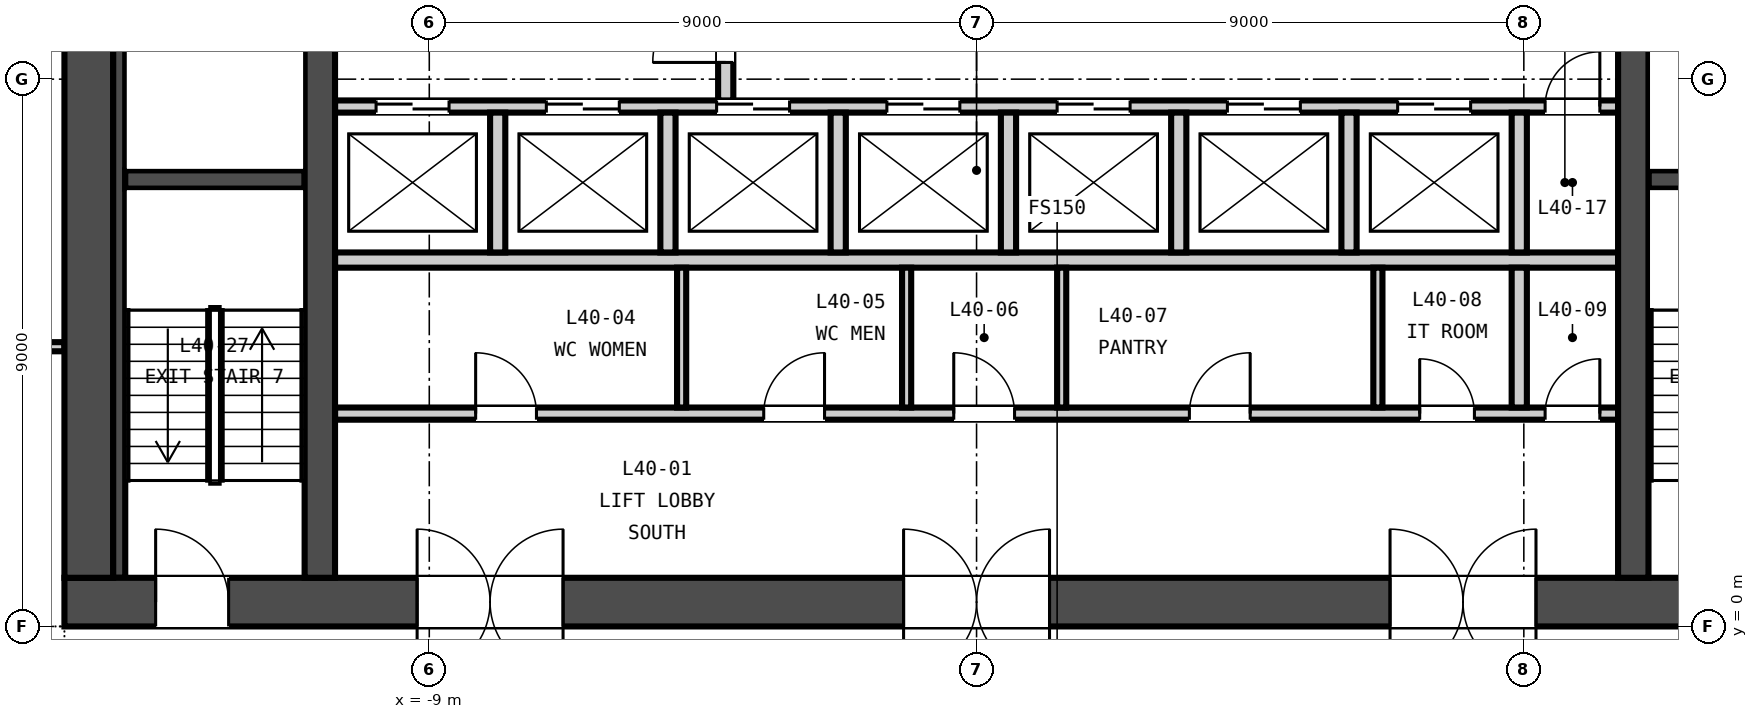
"""IFC4 building model, lengths in metres.
Left out: names, types, materials, properties, quantities, classifications, styles, units other than length and angle.
Written with IfcOpenShell. Run it as: python <this file> out.ifc"""

import sys

from ifc_helpers import new_model, si_unit, direction, frame, frame_2d, origin, place, context, subcontext, project, spatial, rectangle, extrude, element, fill, save


model = new_model("IFC4")
c1 = context("Model", 3, precision=1e-05, world=origin(), true_north=direction((0.0, 1.0)))
c2 = subcontext(c1, "Body", "Model", "MODEL_VIEW")
j1 = project(units=[si_unit("LENGTHUNIT", "METRE"), si_unit("PLANEANGLEUNIT", "RADIAN")], contexts=[c1])
p1 = place(None, origin())
s1 = spatial("IfcSite", under=j1, at=p1, CompositionType="ELEMENT")
p2 = place(p1, origin())
s2 = spatial("IfcBuilding", under=s1, at=p2, CompositionType="ELEMENT")
p3 = place(p2, frame((0.0, 0.0, 162.65)))
s3 = spatial("IfcBuildingStorey", under=s2, at=p3, CompositionType="ELEMENT", Elevation=162.65)
p4 = place(p3, frame((-15.0, 0.4, -0.15), z_axis=(0.0, 0.0, 1.0), x_axis=(1.0, 0.0, 0.0)))
e1 = element("IfcWall", 1, at=p4, inside=s3, PredefinedType="SOLIDWALL", context=c2, shape_type="SweptSolid", body=[
    extrude(rectangle(XDim=30.0, YDim=0.8, at=frame_2d((15.0, 0.0))), origin(), (0.0, 0.0, 1.0), 3.5),
])
p5 = place(p4, frame((5.8, 0.0, 0.15)))
e2 = element("IfcOpeningElement", 2, at=p5, cuts=e1, PredefinedType="OPENING", context=c2, shape_type="SweptSolid", body=[
    extrude(rectangle(XDim=2.4, YDim=2.4, at=frame_2d((1.2, 1.2))), frame((0.0, 0.41, 0.0), z_axis=(0.0, -1.0, 0.0), x_axis=(1.0, 0.0, 0.0)), (0.0, 0.0, 1.0), 0.82),
])
p6 = place(p4, frame((13.8, 0.0, 0.15)))
e3 = element("IfcOpeningElement", 3, at=p6, cuts=e1, PredefinedType="OPENING", context=c2, shape_type="SweptSolid", body=[
    extrude(rectangle(XDim=2.4, YDim=2.4, at=frame_2d((1.2, 1.2))), frame((0.0, 0.41, 0.0), z_axis=(0.0, -1.0, 0.0), x_axis=(1.0, 0.0, 0.0)), (0.0, 0.0, 1.0), 0.82),
])
p7 = place(p4, frame((21.8, 0.0, 0.15)))
e4 = element("IfcOpeningElement", 4, at=p7, cuts=e1, PredefinedType="OPENING", context=c2, shape_type="SweptSolid", body=[
    extrude(rectangle(XDim=2.4, YDim=2.4, at=frame_2d((1.2, 1.2))), frame((0.0, 0.41, 0.0), z_axis=(0.0, -1.0, 0.0), x_axis=(1.0, 0.0, 0.0)), (0.0, 0.0, 1.0), 0.82),
])
p8 = place(p4, frame((1.5, 0.0, 0.15)))
e5 = element("IfcOpeningElement", 5, at=p8, cuts=e1, PredefinedType="OPENING", context=c2, shape_type="SweptSolid", body=[
    extrude(rectangle(XDim=1.2, YDim=2.1, at=frame_2d((0.6, 1.05))), frame((0.0, 0.41, 0.0), z_axis=(0.0, -1.0, 0.0), x_axis=(1.0, 0.0, 0.0)), (0.0, 0.0, 1.0), 0.82),
])
p9 = place(p4, frame((27.3, 0.0, 0.15)))
e6 = element("IfcOpeningElement", 6, at=p9, cuts=e1, PredefinedType="OPENING", context=c2, shape_type="SweptSolid", body=[
    extrude(rectangle(XDim=1.2, YDim=2.1, at=frame_2d((0.6, 1.05))), frame((0.0, 0.41, 0.0), z_axis=(0.0, -1.0, 0.0), x_axis=(1.0, 0.0, 0.0)), (0.0, 0.0, 1.0), 0.82),
])
p10 = place(p3, frame((-14.6, 0.8, -0.15), z_axis=(0.0, 0.0, 1.0), x_axis=(0.0, 1.0, 0.0)))
e7 = element("IfcWall", 7, at=p10, inside=s3, PredefinedType="SOLIDWALL", context=c2, shape_type="SweptSolid", body=[
    extrude(rectangle(XDim=13.4, YDim=0.8, at=frame_2d((6.7, 0.0))), origin(), (0.0, 0.0, 1.0), 3.5),
])
for number, where, z_axis, x_axis in (
    (8, (-10.8, 0.8, -0.15), (0.0, 0.0, 1.0), (0.0, 1.0, 0.0)),
    (9, (10.8, 0.8, -0.15), (0.0, 0.0, 1.0), (0.0, 1.0, 0.0)),
):
    element("IfcWall", number, at=place(p3, frame(where, z_axis=z_axis, x_axis=x_axis)), inside=s3, PredefinedType="SOLIDWALL", context=c2, shape_type="SweptSolid", body=[
        extrude(rectangle(XDim=13.4, YDim=0.5, at=frame_2d((6.7, 0.0))), origin(), (0.0, 0.0, 1.0), 3.5),
    ])
p11 = place(p3, frame((-10.55, 3.5, 0.0), z_axis=(0.0, 0.0, 1.0), x_axis=(1.0, 0.0, 0.0)))
e10 = element("IfcWall", 10, at=p11, inside=s3, PredefinedType="PARTITIONING", context=c2, shape_type="SweptSolid", body=[
    extrude(rectangle(XDim=21.1, YDim=0.2, at=frame_2d((10.55, 0.0))), origin(), (0.0, 0.0, 1.0), 3.35),
])
p12 = place(p11, frame((2.312, 0.0, 0.0)))
e11 = element("IfcOpeningElement", 11, at=p12, cuts=e10, PredefinedType="OPENING", context=c2, shape_type="SweptSolid", body=[
    extrude(rectangle(XDim=1.0, YDim=2.1, at=frame_2d((0.5, 1.05))), frame((0.0, 0.11, 0.0), z_axis=(0.0, -1.0, 0.0), x_axis=(1.0, 0.0, 0.0)), (0.0, 0.0, 1.0), 0.22),
])
p13 = place(p11, frame((7.05, 0.0, 0.0)))
e12 = element("IfcOpeningElement", 12, at=p13, cuts=e10, PredefinedType="OPENING", context=c2, shape_type="SweptSolid", body=[
    extrude(rectangle(XDim=1.0, YDim=2.1, at=frame_2d((0.5, 1.05))), frame((0.0, 0.11, 0.0), z_axis=(0.0, -1.0, 0.0), x_axis=(1.0, 0.0, 0.0)), (0.0, 0.0, 1.0), 0.22),
])
p14 = place(p11, frame((10.175, 0.0, 0.0)))
e13 = element("IfcOpeningElement", 13, at=p14, cuts=e10, PredefinedType="OPENING", context=c2, shape_type="SweptSolid", body=[
    extrude(rectangle(XDim=1.0, YDim=2.1, at=frame_2d((0.5, 1.05))), frame((0.0, 0.11, 0.0), z_axis=(0.0, -1.0, 0.0), x_axis=(1.0, 0.0, 0.0)), (0.0, 0.0, 1.0), 0.22),
])
p15 = place(p11, frame((14.05, 0.0, 0.0)))
e14 = element("IfcOpeningElement", 14, at=p15, cuts=e10, PredefinedType="OPENING", context=c2, shape_type="SweptSolid", body=[
    extrude(rectangle(XDim=1.0, YDim=2.1, at=frame_2d((0.5, 1.05))), frame((0.0, 0.11, 0.0), z_axis=(0.0, -1.0, 0.0), x_axis=(1.0, 0.0, 0.0)), (0.0, 0.0, 1.0), 0.22),
])
p16 = place(p11, frame((17.837, 0.0, 0.0)))
e15 = element("IfcOpeningElement", 15, at=p16, cuts=e10, PredefinedType="OPENING", context=c2, shape_type="SweptSolid", body=[
    extrude(rectangle(XDim=0.9, YDim=2.1, at=frame_2d((0.45, 1.05))), frame((0.0, 0.11, 0.0), z_axis=(0.0, -1.0, 0.0), x_axis=(1.0, 0.0, 0.0)), (0.0, 0.0, 1.0), 0.22),
])
p17 = place(p11, frame((19.9, 0.0, 0.0)))
e16 = element("IfcOpeningElement", 16, at=p17, cuts=e10, PredefinedType="OPENING", context=c2, shape_type="SweptSolid", body=[
    extrude(rectangle(XDim=0.9, YDim=2.1, at=frame_2d((0.45, 1.05))), frame((0.0, 0.11, 0.0), z_axis=(0.0, -1.0, 0.0), x_axis=(1.0, 0.0, 0.0)), (0.0, 0.0, 1.0), 0.22),
])
p18 = place(p3, frame((-10.55, 6.025, 0.0), z_axis=(0.0, 0.0, 1.0), x_axis=(1.0, 0.0, 0.0)))
e17 = element("IfcWall", 17, at=p18, inside=s3, PredefinedType="PARTITIONING", context=c2, shape_type="SweptSolid", body=[
    extrude(rectangle(XDim=21.1, YDim=0.25, at=frame_2d((10.55, 0.0))), origin(), (0.0, 0.0, 1.0), 3.35),
])
p19 = place(p3, frame((-10.55, 8.55, 0.0), z_axis=(0.0, 0.0, 1.0), x_axis=(1.0, 0.0, 0.0)))
e18 = element("IfcWall", 18, at=p19, inside=s3, PredefinedType="PARTITIONING", context=c2, shape_type="SweptSolid", body=[
    extrude(rectangle(XDim=21.1, YDim=0.2, at=frame_2d((10.55, 0.0))), origin(), (0.0, 0.0, 1.0), 3.35),
])
p20 = place(p19, frame((0.675, 0.0, 0.0)))
e19 = element("IfcOpeningElement", 19, at=p20, cuts=e18, PredefinedType="OPENING", context=c2, shape_type="SweptSolid", body=[
    extrude(rectangle(XDim=1.2, YDim=2.1, at=frame_2d((0.6, 1.05))), frame((0.0, 0.11, 0.0), z_axis=(0.0, -1.0, 0.0), x_axis=(1.0, 0.0, 0.0)), (0.0, 0.0, 1.0), 0.22),
])
p21 = place(p19, frame((3.475, 0.0, 0.0)))
e20 = element("IfcOpeningElement", 20, at=p21, cuts=e18, PredefinedType="OPENING", context=c2, shape_type="SweptSolid", body=[
    extrude(rectangle(XDim=1.2, YDim=2.1, at=frame_2d((0.6, 1.05))), frame((0.0, 0.11, 0.0), z_axis=(0.0, -1.0, 0.0), x_axis=(1.0, 0.0, 0.0)), (0.0, 0.0, 1.0), 0.22),
])
p22 = place(p19, frame((6.275, 0.0, 0.0)))
e21 = element("IfcOpeningElement", 21, at=p22, cuts=e18, PredefinedType="OPENING", context=c2, shape_type="SweptSolid", body=[
    extrude(rectangle(XDim=1.2, YDim=2.1, at=frame_2d((0.6, 1.05))), frame((0.0, 0.11, 0.0), z_axis=(0.0, -1.0, 0.0), x_axis=(1.0, 0.0, 0.0)), (0.0, 0.0, 1.0), 0.22),
])
p23 = place(p19, frame((9.075, 0.0, 0.0)))
e22 = element("IfcOpeningElement", 22, at=p23, cuts=e18, PredefinedType="OPENING", context=c2, shape_type="SweptSolid", body=[
    extrude(rectangle(XDim=1.2, YDim=2.1, at=frame_2d((0.6, 1.05))), frame((0.0, 0.11, 0.0), z_axis=(0.0, -1.0, 0.0), x_axis=(1.0, 0.0, 0.0)), (0.0, 0.0, 1.0), 0.22),
])
p24 = place(p19, frame((11.875, 0.0, 0.0)))
e23 = element("IfcOpeningElement", 23, at=p24, cuts=e18, PredefinedType="OPENING", context=c2, shape_type="SweptSolid", body=[
    extrude(rectangle(XDim=1.2, YDim=2.1, at=frame_2d((0.6, 1.05))), frame((0.0, 0.11, 0.0), z_axis=(0.0, -1.0, 0.0), x_axis=(1.0, 0.0, 0.0)), (0.0, 0.0, 1.0), 0.22),
])
p25 = place(p19, frame((14.675, 0.0, 0.0)))
e24 = element("IfcOpeningElement", 24, at=p25, cuts=e18, PredefinedType="OPENING", context=c2, shape_type="SweptSolid", body=[
    extrude(rectangle(XDim=1.2, YDim=2.1, at=frame_2d((0.6, 1.05))), frame((0.0, 0.11, 0.0), z_axis=(0.0, -1.0, 0.0), x_axis=(1.0, 0.0, 0.0)), (0.0, 0.0, 1.0), 0.22),
])
p26 = place(p19, frame((17.475, 0.0, 0.0)))
e25 = element("IfcOpeningElement", 25, at=p26, cuts=e18, PredefinedType="OPENING", context=c2, shape_type="SweptSolid", body=[
    extrude(rectangle(XDim=1.2, YDim=2.1, at=frame_2d((0.6, 1.05))), frame((0.0, 0.11, 0.0), z_axis=(0.0, -1.0, 0.0), x_axis=(1.0, 0.0, 0.0)), (0.0, 0.0, 1.0), 0.22),
])
p27 = place(p19, frame((19.9, 0.0, 0.0)))
e26 = element("IfcOpeningElement", 26, at=p27, cuts=e18, PredefinedType="OPENING", context=c2, shape_type="SweptSolid", body=[
    extrude(rectangle(XDim=0.9, YDim=2.1, at=frame_2d((0.45, 1.05))), frame((0.0, 0.11, 0.0), z_axis=(0.0, -1.0, 0.0), x_axis=(1.0, 0.0, 0.0)), (0.0, 0.0, 1.0), 0.22),
])
p28 = place(p3, frame((-4.125, 8.65, 0.0), z_axis=(0.0, 0.0, 1.0), x_axis=(0.0, 1.0, 0.0)))
e27 = element("IfcWall", 27, at=p28, inside=s3, PredefinedType="PARTITIONING", context=c2, shape_type="SweptSolid", body=[
    extrude(rectangle(XDim=2.45, YDim=0.25, at=frame_2d((1.225, 0.0))), origin(), (0.0, 0.0, 1.0), 3.35),
])
p29 = place(p28, frame((0.625, 0.0, 0.0)))
e28 = element("IfcOpeningElement", 28, at=p29, cuts=e27, PredefinedType="OPENING", context=c2, shape_type="SweptSolid", body=[
    extrude(rectangle(XDim=1.2, YDim=2.1, at=frame_2d((0.6, 1.05))), frame((0.0, 0.135, 0.0), z_axis=(0.0, -1.0, 0.0), x_axis=(1.0, 0.0, 0.0)), (0.0, 0.0, 1.0), 0.27),
])
for number, where, z_axis, x_axis in (
    (29, (-4.85, 3.6, 0.0), (0.0, 0.0, 1.0), (0.0, 1.0, 0.0)),
    (30, (-1.15, 3.6, 0.0), (0.0, 0.0, 1.0), (0.0, 1.0, 0.0)),
    (31, (1.4, 3.6, 0.0), (0.0, 0.0, 1.0), (0.0, 1.0, 0.0)),
    (32, (6.6, 3.6, 0.0), (0.0, 0.0, 1.0), (0.0, 1.0, 0.0)),
):
    element("IfcWall", number, at=place(p3, frame(where, z_axis=z_axis, x_axis=x_axis)), inside=s3, PredefinedType="PARTITIONING", context=c2, shape_type="SweptSolid", body=[
        extrude(rectangle(XDim=2.3, YDim=0.15, at=frame_2d((1.15, 0.0))), origin(), (0.0, 0.0, 1.0), 3.35),
    ])
p30 = place(p3, frame((8.925, 3.6, 0.0), z_axis=(0.0, 0.0, 1.0), x_axis=(0.0, 1.0, 0.0)))
e33 = element("IfcWall", 33, at=p30, inside=s3, PredefinedType="PARTITIONING", context=c2, shape_type="SweptSolid", body=[
    extrude(rectangle(XDim=2.3, YDim=0.25, at=frame_2d((1.15, 0.0))), origin(), (0.0, 0.0, 1.0), 3.35),
])
for number, where, z_axis, x_axis in (
    (34, (-7.875, 6.15, 0.0), (0.0, 0.0, 1.0), (0.0, 1.0, 0.0)),
    (35, (-5.075, 6.15, 0.0), (0.0, 0.0, 1.0), (0.0, 1.0, 0.0)),
    (36, (-2.275, 6.15, 0.0), (0.0, 0.0, 1.0), (0.0, 1.0, 0.0)),
    (37, (0.525, 6.15, 0.0), (0.0, 0.0, 1.0), (0.0, 1.0, 0.0)),
    (38, (3.325, 6.15, 0.0), (0.0, 0.0, 1.0), (0.0, 1.0, 0.0)),
    (39, (6.125, 6.15, 0.0), (0.0, 0.0, 1.0), (0.0, 1.0, 0.0)),
    (40, (8.925, 6.15, 0.0), (0.0, 0.0, 1.0), (0.0, 1.0, 0.0)),
):
    element("IfcWall", number, at=place(p3, frame(where, z_axis=z_axis, x_axis=x_axis)), inside=s3, PredefinedType="PARTITIONING", context=c2, shape_type="SweptSolid", body=[
        extrude(rectangle(XDim=2.3, YDim=0.25, at=frame_2d((1.15, 0.0))), origin(), (0.0, 0.0, 1.0), 3.35),
    ])
p31 = place(p3, frame((-14.0, 7.35, 0.0), z_axis=(0.0, 0.0, 1.0), x_axis=(1.0, 0.0, 0.0)))
e41 = element("IfcWall", 41, at=p31, inside=s3, PredefinedType="SOLIDWALL", context=c2, shape_type="SweptSolid", body=[
    extrude(rectangle(XDim=2.95, YDim=0.3, at=frame_2d((1.475, 0.0))), origin(), (0.0, 0.0, 1.0), 3.35),
])
p32 = place(p3, frame((-14.1, 0.8, 0.0), z_axis=(0.0, 0.0, 1.0), x_axis=(0.0, 1.0, 0.0)))
e42 = element("IfcWall", 42, at=p32, inside=s3, PredefinedType="SOLIDWALL", context=c2, shape_type="SweptSolid", body=[
    extrude(rectangle(XDim=13.4, YDim=0.2, at=frame_2d((6.7, 0.0))), origin(), (0.0, 0.0, 1.0), 3.35),
])
p33 = place(p3, frame((11.05, 7.35, 0.0), z_axis=(0.0, 0.0, 1.0), x_axis=(1.0, 0.0, 0.0)))
e43 = element("IfcWall", 43, at=p33, inside=s3, PredefinedType="SOLIDWALL", context=c2, shape_type="SweptSolid", body=[
    extrude(rectangle(XDim=2.95, YDim=0.3, at=frame_2d((1.475, 0.0))), origin(), (0.0, 0.0, 1.0), 3.35),
])
p34 = place(p3, frame((-15.0, 13.531, 0.0), z_axis=(0.0, 0.0, 1.0), x_axis=(-0.347347751601, -0.937736391241, 0.0)))
e44 = element("IfcWall", 44, at=p34, inside=s3, PredefinedType="PARTITIONING", context=c2, shape_type="SweptSolid", body=[
    extrude(rectangle(XDim=9.524, YDim=0.15, at=frame_2d((4.762, 0.0))), origin(), (0.0, 0.0, 1.0), 2.591),
])
p35 = place(p34, frame((4.262, 0.0, 0.0)))
e45 = element("IfcOpeningElement", 45, at=p35, cuts=e44, PredefinedType="OPENING", context=c2, shape_type="SweptSolid", body=[
    extrude(rectangle(XDim=1.0, YDim=2.1, at=frame_2d((0.5, 1.05))), frame((0.0, 0.085, 0.0), z_axis=(0.0, -1.0, 0.0), x_axis=(1.0, 0.0, 0.0)), (0.0, 0.0, 1.0), 0.17),
])
p36 = place(p3, frame((-18.228, 4.6, 0.0), z_axis=(0.0, 0.0, 1.0), x_axis=(1.0, 0.0, 0.0)))
e46 = element("IfcWall", 46, at=p36, inside=s3, PredefinedType="PARTITIONING", context=c2, shape_type="SweptSolid", body=[
    extrude(rectangle(XDim=3.228, YDim=0.15, at=frame_2d((1.614, 0.0))), origin(), (0.0, 0.0, 1.0), 2.591),
])
p37 = place(p29, origin())
e47 = element("IfcDoor", 47, at=p37, inside=s3, OperationType="SINGLE_SWING_LEFT", PredefinedType="DOOR", context=c2, shape_type="SweptSolid", body=[
    extrude(rectangle(XDim=1.2, YDim=2.1, at=frame_2d((0.6, 1.05))), frame((0.0, 0.025, 0.0), z_axis=(0.0, -1.0, 0.0), x_axis=(1.0, 0.0, 0.0)), (0.0, 0.0, 1.0), 0.05),
])
fill(e28, e47)
p38 = place(p12, origin())
e48 = element("IfcDoor", 48, at=p38, inside=s3, OperationType="SINGLE_SWING_LEFT", PredefinedType="DOOR", context=c2, shape_type="SweptSolid", body=[
    extrude(rectangle(XDim=1.0, YDim=2.1, at=frame_2d((0.5, 1.05))), frame((0.0, 0.025, 0.0), z_axis=(0.0, -1.0, 0.0), x_axis=(1.0, 0.0, 0.0)), (0.0, 0.0, 1.0), 0.05),
])
fill(e11, e48)
p39 = place(p13, origin())
e49 = element("IfcDoor", 49, at=p39, inside=s3, OperationType="SINGLE_SWING_RIGHT", PredefinedType="DOOR", context=c2, shape_type="SweptSolid", body=[
    extrude(rectangle(XDim=1.0, YDim=2.1, at=frame_2d((0.5, 1.05))), frame((0.0, 0.025, 0.0), z_axis=(0.0, -1.0, 0.0), x_axis=(1.0, 0.0, 0.0)), (0.0, 0.0, 1.0), 0.05),
])
fill(e12, e49)
p40 = place(p14, origin())
e50 = element("IfcDoor", 50, at=p40, inside=s3, OperationType="SINGLE_SWING_LEFT", PredefinedType="DOOR", context=c2, shape_type="SweptSolid", body=[
    extrude(rectangle(XDim=1.0, YDim=2.1, at=frame_2d((0.5, 1.05))), frame((0.0, 0.025, 0.0), z_axis=(0.0, -1.0, 0.0), x_axis=(1.0, 0.0, 0.0)), (0.0, 0.0, 1.0), 0.05),
])
fill(e13, e50)
p41 = place(p15, origin())
e51 = element("IfcDoor", 51, at=p41, inside=s3, OperationType="SINGLE_SWING_RIGHT", PredefinedType="DOOR", context=c2, shape_type="SweptSolid", body=[
    extrude(rectangle(XDim=1.0, YDim=2.1, at=frame_2d((0.5, 1.05))), frame((0.0, 0.025, 0.0), z_axis=(0.0, -1.0, 0.0), x_axis=(1.0, 0.0, 0.0)), (0.0, 0.0, 1.0), 0.05),
])
fill(e14, e51)
p42 = place(p16, origin())
e52 = element("IfcDoor", 52, at=p42, inside=s3, OperationType="SINGLE_SWING_LEFT", PredefinedType="DOOR", context=c2, shape_type="SweptSolid", body=[
    extrude(rectangle(XDim=0.9, YDim=2.1, at=frame_2d((0.45, 1.05))), frame((0.0, 0.025, 0.0), z_axis=(0.0, -1.0, 0.0), x_axis=(1.0, 0.0, 0.0)), (0.0, 0.0, 1.0), 0.05),
])
fill(e15, e52)
p43 = place(p17, origin())
e53 = element("IfcDoor", 53, at=p43, inside=s3, OperationType="SINGLE_SWING_RIGHT", PredefinedType="DOOR", context=c2, shape_type="SweptSolid", body=[
    extrude(rectangle(XDim=0.9, YDim=2.1, at=frame_2d((0.45, 1.05))), frame((0.0, 0.025, 0.0), z_axis=(0.0, -1.0, 0.0), x_axis=(1.0, 0.0, 0.0)), (0.0, 0.0, 1.0), 0.05),
])
fill(e16, e53)
p44 = place(p20, origin())
e54 = element("IfcDoor", 54, at=p44, inside=s3, OperationType="DOUBLE_DOOR_SLIDING", PredefinedType="DOOR", context=c2, shape_type="SweptSolid", body=[
    extrude(rectangle(XDim=1.2, YDim=2.1, at=frame_2d((0.6, 1.05))), frame((0.0, 0.025, 0.0), z_axis=(0.0, -1.0, 0.0), x_axis=(1.0, 0.0, 0.0)), (0.0, 0.0, 1.0), 0.05),
])
fill(e19, e54)
p45 = place(p21, origin())
e55 = element("IfcDoor", 55, at=p45, inside=s3, OperationType="DOUBLE_DOOR_SLIDING", PredefinedType="DOOR", context=c2, shape_type="SweptSolid", body=[
    extrude(rectangle(XDim=1.2, YDim=2.1, at=frame_2d((0.6, 1.05))), frame((0.0, 0.025, 0.0), z_axis=(0.0, -1.0, 0.0), x_axis=(1.0, 0.0, 0.0)), (0.0, 0.0, 1.0), 0.05),
])
fill(e20, e55)
p46 = place(p22, origin())
e56 = element("IfcDoor", 56, at=p46, inside=s3, OperationType="DOUBLE_DOOR_SLIDING", PredefinedType="DOOR", context=c2, shape_type="SweptSolid", body=[
    extrude(rectangle(XDim=1.2, YDim=2.1, at=frame_2d((0.6, 1.05))), frame((0.0, 0.025, 0.0), z_axis=(0.0, -1.0, 0.0), x_axis=(1.0, 0.0, 0.0)), (0.0, 0.0, 1.0), 0.05),
])
fill(e21, e56)
p47 = place(p23, origin())
e57 = element("IfcDoor", 57, at=p47, inside=s3, OperationType="DOUBLE_DOOR_SLIDING", PredefinedType="DOOR", context=c2, shape_type="SweptSolid", body=[
    extrude(rectangle(XDim=1.2, YDim=2.1, at=frame_2d((0.6, 1.05))), frame((0.0, 0.025, 0.0), z_axis=(0.0, -1.0, 0.0), x_axis=(1.0, 0.0, 0.0)), (0.0, 0.0, 1.0), 0.05),
])
fill(e22, e57)
p48 = place(p24, origin())
e58 = element("IfcDoor", 58, at=p48, inside=s3, OperationType="DOUBLE_DOOR_SLIDING", PredefinedType="DOOR", context=c2, shape_type="SweptSolid", body=[
    extrude(rectangle(XDim=1.2, YDim=2.1, at=frame_2d((0.6, 1.05))), frame((0.0, 0.025, 0.0), z_axis=(0.0, -1.0, 0.0), x_axis=(1.0, 0.0, 0.0)), (0.0, 0.0, 1.0), 0.05),
])
fill(e23, e58)
p49 = place(p25, origin())
e59 = element("IfcDoor", 59, at=p49, inside=s3, OperationType="DOUBLE_DOOR_SLIDING", PredefinedType="DOOR", context=c2, shape_type="SweptSolid", body=[
    extrude(rectangle(XDim=1.2, YDim=2.1, at=frame_2d((0.6, 1.05))), frame((0.0, 0.025, 0.0), z_axis=(0.0, -1.0, 0.0), x_axis=(1.0, 0.0, 0.0)), (0.0, 0.0, 1.0), 0.05),
])
fill(e24, e59)
p50 = place(p26, origin())
e60 = element("IfcDoor", 60, at=p50, inside=s3, OperationType="DOUBLE_DOOR_SLIDING", PredefinedType="DOOR", context=c2, shape_type="SweptSolid", body=[
    extrude(rectangle(XDim=1.2, YDim=2.1, at=frame_2d((0.6, 1.05))), frame((0.0, 0.025, 0.0), z_axis=(0.0, -1.0, 0.0), x_axis=(1.0, 0.0, 0.0)), (0.0, 0.0, 1.0), 0.05),
])
fill(e25, e60)
p51 = place(p27, origin())
e61 = element("IfcDoor", 61, at=p51, inside=s3, OperationType="SINGLE_SWING_RIGHT", PredefinedType="DOOR", context=c2, shape_type="SweptSolid", body=[
    extrude(rectangle(XDim=0.9, YDim=2.1, at=frame_2d((0.45, 1.05))), frame((0.0, 0.025, 0.0), z_axis=(0.0, -1.0, 0.0), x_axis=(1.0, 0.0, 0.0)), (0.0, 0.0, 1.0), 0.05),
])
fill(e26, e61)
p52 = place(p5, origin())
e62 = element("IfcDoor", 62, at=p52, inside=s3, OperationType="DOUBLE_DOOR_DOUBLE_SWING", PredefinedType="DOOR", context=c2, shape_type="SweptSolid", body=[
    extrude(rectangle(XDim=2.4, YDim=2.4, at=frame_2d((1.2, 1.2))), frame((0.0, 0.025, 0.0), z_axis=(0.0, -1.0, 0.0), x_axis=(1.0, 0.0, 0.0)), (0.0, 0.0, 1.0), 0.05),
])
fill(e2, e62)
p53 = place(p6, origin())
e63 = element("IfcDoor", 63, at=p53, inside=s3, OperationType="DOUBLE_DOOR_DOUBLE_SWING", PredefinedType="DOOR", context=c2, shape_type="SweptSolid", body=[
    extrude(rectangle(XDim=2.4, YDim=2.4, at=frame_2d((1.2, 1.2))), frame((0.0, 0.025, 0.0), z_axis=(0.0, -1.0, 0.0), x_axis=(1.0, 0.0, 0.0)), (0.0, 0.0, 1.0), 0.05),
])
fill(e3, e63)
p54 = place(p7, origin())
e64 = element("IfcDoor", 64, at=p54, inside=s3, OperationType="DOUBLE_DOOR_DOUBLE_SWING", PredefinedType="DOOR", context=c2, shape_type="SweptSolid", body=[
    extrude(rectangle(XDim=2.4, YDim=2.4, at=frame_2d((1.2, 1.2))), frame((0.0, 0.025, 0.0), z_axis=(0.0, -1.0, 0.0), x_axis=(1.0, 0.0, 0.0)), (0.0, 0.0, 1.0), 0.05),
])
fill(e4, e64)
p55 = place(p8, origin())
e65 = element("IfcDoor", 65, at=p55, inside=s3, OperationType="SINGLE_SWING_LEFT", PredefinedType="DOOR", context=c2, shape_type="SweptSolid", body=[
    extrude(rectangle(XDim=1.2, YDim=2.1, at=frame_2d((0.6, 1.05))), frame((0.0, 0.025, 0.0), z_axis=(0.0, -1.0, 0.0), x_axis=(1.0, 0.0, 0.0)), (0.0, 0.0, 1.0), 0.05),
])
fill(e5, e65)
save(model, sys.argv[1])
